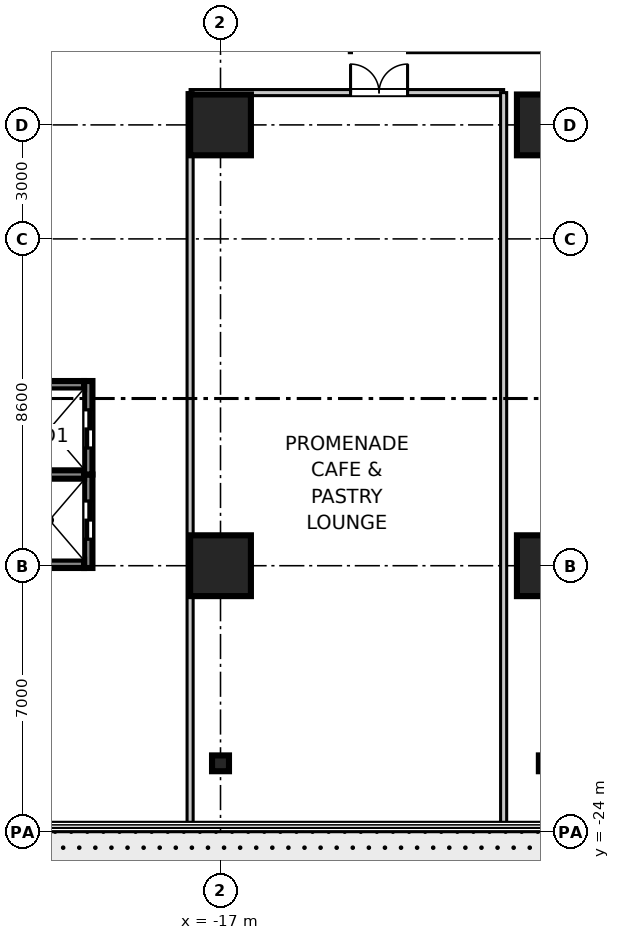
"""IFC4 building model, lengths in metres.
Left out: names, types, materials, properties, quantities, classifications, styles, units other than length and angle.
Written with IfcOpenShell. Run it as: python <this file> out.ifc"""

import sys

from ifc_helpers import new_model, si_unit, direction, frame, frame_2d, origin, origin_2d, place, context, subcontext, project, spatial, rectangle, i_section, extrude, source, transform, mapped, element, fill, save


model = new_model("IFC4")
c1 = context("Model", 3, precision=1e-05, world=origin(), true_north=direction((0.0, 1.0)))
c2 = subcontext(c1, "Body", "Model", "MODEL_VIEW")
j1 = project(units=[si_unit("LENGTHUNIT", "METRE"), si_unit("PLANEANGLEUNIT", "RADIAN")], contexts=[c1])
p1 = place(None, origin())
s1 = spatial("IfcSite", under=j1, at=p1, CompositionType="ELEMENT")
p2 = place(p1, origin())
s2 = spatial("IfcBuilding", under=s1, at=p2, CompositionType="ELEMENT")
p3 = place(p2, origin())
s3 = spatial("IfcBuildingStorey", under=s2, at=p3, CompositionType="ELEMENT", Elevation=0.0)
m1 = source(origin(), c2, "Body", "SweptSolid", [
    extrude(rectangle(XDim=1.6, YDim=1.6, at=origin_2d()), origin(), (0.0, 0.0, 1.0), 5.355),
])
for number, where, z_axis, x_axis in (
    (1, (-17.0, -17.0, 0.0), (0.0, 0.0, 1.0), (1.0, 0.0, 0.0)),
    (2, (-17.0, -5.4, 0.0), (0.0, 0.0, 1.0), (1.0, 0.0, 0.0)),
    (3, (-8.4, -17.0, 0.0), (0.0, 0.0, 1.0), (1.0, 0.0, 0.0)),
    (4, (-8.4, -5.4, 0.0), (0.0, 0.0, 1.0), (1.0, 0.0, 0.0)),
):
    element("IfcColumn", number, at=place(p3, frame(where, z_axis=z_axis, x_axis=x_axis)), inside=s3, PredefinedType="COLUMN", context=c2, shape_type="MappedRepresentation", body=[
        mapped(m1, transform((0.0, 0.0, 0.0), scale=1.0)),
    ])
m2 = source(origin(), c2, "Body", "SweptSolid", [
    extrude(i_section(OverallWidth=0.416, OverallDepth=0.446, WebThickness=0.025, FlangeThickness=0.04, at=origin_2d()), origin(), (0.0, 0.0, 1.0), 5.355),
])
for number, where, z_axis, x_axis in (
    (5, (-17.0, -22.2, 0.0), (0.0, 0.0, 1.0), (0.0, 1.0, 0.0)),
    (6, (-8.4, -22.2, 0.0), (0.0, 0.0, 1.0), (0.0, 1.0, 0.0)),
):
    element("IfcColumn", number, at=place(p3, frame(where, z_axis=z_axis, x_axis=x_axis)), inside=s3, PredefinedType="COLUMN", context=c2, shape_type="MappedRepresentation", body=[
        mapped(m2, transform((0.0, 0.0, 0.0), scale=1.0)),
    ])
m3 = source(origin(), c2, "Body", "SweptSolid", [
    extrude(rectangle(XDim=2.46, YDim=0.22, at=frame_2d((1.23, 0.0))), origin(), (0.0, 0.0, 1.0), 5.08),
])
p4 = place(p3, frame((-20.48, -17.06, 0.0), z_axis=(0.0, 0.0, 1.0), x_axis=(0.0, 1.0, 0.0)))
e7 = element("IfcWall", 7, at=p4, inside=s3, PredefinedType="SHEAR", context=c2, shape_type="MappedRepresentation", body=[
    mapped(m3, transform((0.0, 0.0, 0.0), scale=1.0)),
])
p5 = place(p4, frame((0.76, 0.0, 0.0)))
e8 = element("IfcOpeningElement", 8, at=p5, cuts=e7, PredefinedType="OPENING", context=c2, shape_type="SweptSolid", body=[
    extrude(rectangle(XDim=1.0, YDim=2.2, at=frame_2d((0.5, 1.1))), frame((0.0, 0.12, 0.0), z_axis=(0.0, -1.0, 0.0), x_axis=(1.0, 0.0, 0.0)), (0.0, 0.0, 1.0), 0.24),
])
m4 = source(origin(), c2, "Body", "SweptSolid", [
    extrude(rectangle(XDim=1.82, YDim=0.22, at=frame_2d((0.91, 0.0))), origin(), (0.0, 0.0, 1.0), 5.08),
])
p6 = place(p3, frame((-22.41, -16.95, 0.0), z_axis=(0.0, 0.0, 1.0), x_axis=(1.0, 0.0, 0.0)))
e9 = element("IfcWall", 9, at=p6, inside=s3, PredefinedType="SHEAR", context=c2, shape_type="MappedRepresentation", body=[
    mapped(m4, transform((0.0, 0.0, 0.0), scale=1.0)),
])
m5 = source(origin(), c2, "Body", "SweptSolid", [
    extrude(rectangle(XDim=1.82, YDim=0.22, at=frame_2d((0.91, 0.0))), origin(), (0.0, 0.0, 1.0), 5.4),
])
p7 = place(p3, frame((-22.41, -14.6, 0.0), z_axis=(0.0, 0.0, 1.0), x_axis=(1.0, 0.0, 0.0)))
e10 = element("IfcWall", 10, at=p7, inside=s3, PredefinedType="SHEAR", context=c2, shape_type="MappedRepresentation", body=[
    mapped(m5, transform((0.0, 0.0, 0.0), scale=1.0)),
])
m6 = source(origin(), c2, "Body", "SweptSolid", [
    extrude(rectangle(XDim=2.46, YDim=0.22, at=frame_2d((1.23, 0.0))), origin(), (0.0, 0.0, 1.0), 5.08),
])
p8 = place(p3, frame((-20.48, -14.6, 0.0), z_axis=(0.0, 0.0, 1.0), x_axis=(0.0, 1.0, 0.0)))
e11 = element("IfcWall", 11, at=p8, inside=s3, PredefinedType="SHEAR", context=c2, shape_type="MappedRepresentation", body=[
    mapped(m6, transform((0.0, 0.0, 0.0), scale=1.0)),
])
p9 = place(p8, frame((0.7, 0.0, 0.0)))
e12 = element("IfcOpeningElement", 12, at=p9, cuts=e11, PredefinedType="OPENING", context=c2, shape_type="SweptSolid", body=[
    extrude(rectangle(XDim=1.0, YDim=2.2, at=frame_2d((0.5, 1.1))), frame((0.0, 0.12, 0.0), z_axis=(0.0, -1.0, 0.0), x_axis=(1.0, 0.0, 0.0)), (0.0, 0.0, 1.0), 0.24),
])
p10 = place(p3, frame((-22.41, -12.25, 0.0), z_axis=(0.0, 0.0, 1.0), x_axis=(1.0, 0.0, 0.0)))
e13 = element("IfcWall", 13, at=p10, inside=s3, PredefinedType="SHEAR", context=c2, shape_type="MappedRepresentation", body=[
    mapped(m4, transform((0.0, 0.0, 0.0), scale=1.0)),
])
m7 = source(origin(), c2, "Body", "SweptSolid", [
    extrude(rectangle(XDim=8.25, YDim=0.16, at=frame_2d((4.125, 0.0))), origin(), (0.0, 0.0, 1.0), 3.4),
])
p11 = place(p3, frame((-17.8, -4.55, 0.0), z_axis=(0.0, 0.0, 1.0), x_axis=(1.0, 0.0, 0.0)))
e14 = element("IfcWall", 14, at=p11, inside=s3, PredefinedType="PARTITIONING", context=c2, shape_type="MappedRepresentation", body=[
    mapped(m7, transform((0.0, 0.0, 0.0), scale=1.0)),
])
p12 = place(p11, frame((4.222, 0.0, 0.0)))
e15 = element("IfcOpeningElement", 15, at=p12, cuts=e14, PredefinedType="OPENING", context=c2, shape_type="SweptSolid", body=[
    extrude(rectangle(XDim=1.5, YDim=2.15, at=frame_2d((0.75, 1.075))), frame((0.0, 0.09, 0.0), z_axis=(0.0, -1.0, 0.0), x_axis=(1.0, 0.0, 0.0)), (0.0, 0.0, 1.0), 0.18),
])
m8 = source(origin(), c2, "Body", "SweptSolid", [
    extrude(rectangle(XDim=19.21, YDim=0.16, at=frame_2d((9.605, 0.0))), origin(), (0.0, 0.0, 1.0), 3.4),
])
for number, where, z_axis, x_axis in (
    (16, (-17.8, -23.76, 0.0), (0.0, 0.0, 1.0), (0.0, 1.0, 0.0)),
    (17, (-9.55, -23.76, 0.0), (0.0, 0.0, 1.0), (0.0, 1.0, 0.0)),
):
    element("IfcWall", number, at=place(p3, frame(where, z_axis=z_axis, x_axis=x_axis)), inside=s3, PredefinedType="PARTITIONING", context=c2, shape_type="MappedRepresentation", body=[
        mapped(m8, transform((0.0, 0.0, 0.0), scale=1.0)),
    ])
m9 = source(origin(), c2, "Body", "SweptSolid", [
    extrude(rectangle(XDim=1.0, YDim=2.2, at=frame_2d((0.5, 1.1))), frame((0.0, 0.025, 0.0), z_axis=(0.0, -1.0, 0.0), x_axis=(1.0, 0.0, 0.0)), (0.0, 0.0, 1.0), 0.05),
])
p13 = place(p5, frame((1.0, 0.0, 0.0), z_axis=(0.0, 0.0, 1.0), x_axis=(-1.0, 0.0, 0.0)))
e18 = element("IfcDoor", 18, at=p13, inside=s3, OperationType="DOUBLE_DOOR_SLIDING", PredefinedType="DOOR", context=c2, shape_type="MappedRepresentation", body=[
    mapped(m9, transform((0.0, 0.0, 0.0), scale=1.0)),
])
fill(e8, e18)
p14 = place(p9, frame((1.0, 0.0, 0.0), z_axis=(0.0, 0.0, 1.0), x_axis=(-1.0, 0.0, 0.0)))
e19 = element("IfcDoor", 19, at=p14, inside=s3, OperationType="DOUBLE_DOOR_SLIDING", PredefinedType="DOOR", context=c2, shape_type="MappedRepresentation", body=[
    mapped(m9, transform((0.0, 0.0, 0.0), scale=1.0)),
])
fill(e12, e19)
m10 = source(origin(), c2, "Body", "SweptSolid", [
    extrude(rectangle(XDim=1.5, YDim=2.15, at=frame_2d((0.75, 1.075))), frame((0.0, 0.025, 0.0), z_axis=(0.0, -1.0, 0.0), x_axis=(1.0, 0.0, 0.0)), (0.0, 0.0, 1.0), 0.05),
])
p15 = place(p12, frame((1.5, 0.0, 0.0), z_axis=(0.0, 0.0, 1.0), x_axis=(-1.0, 0.0, 0.0)))
e20 = element("IfcDoor", 20, at=p15, inside=s3, OperationType="DOUBLE_DOOR_SINGLE_SWING", PredefinedType="DOOR", context=c2, shape_type="MappedRepresentation", body=[
    mapped(m10, transform((0.0, 0.0, 0.0), scale=1.0)),
])
fill(e15, e20)
save(model, sys.argv[1])
